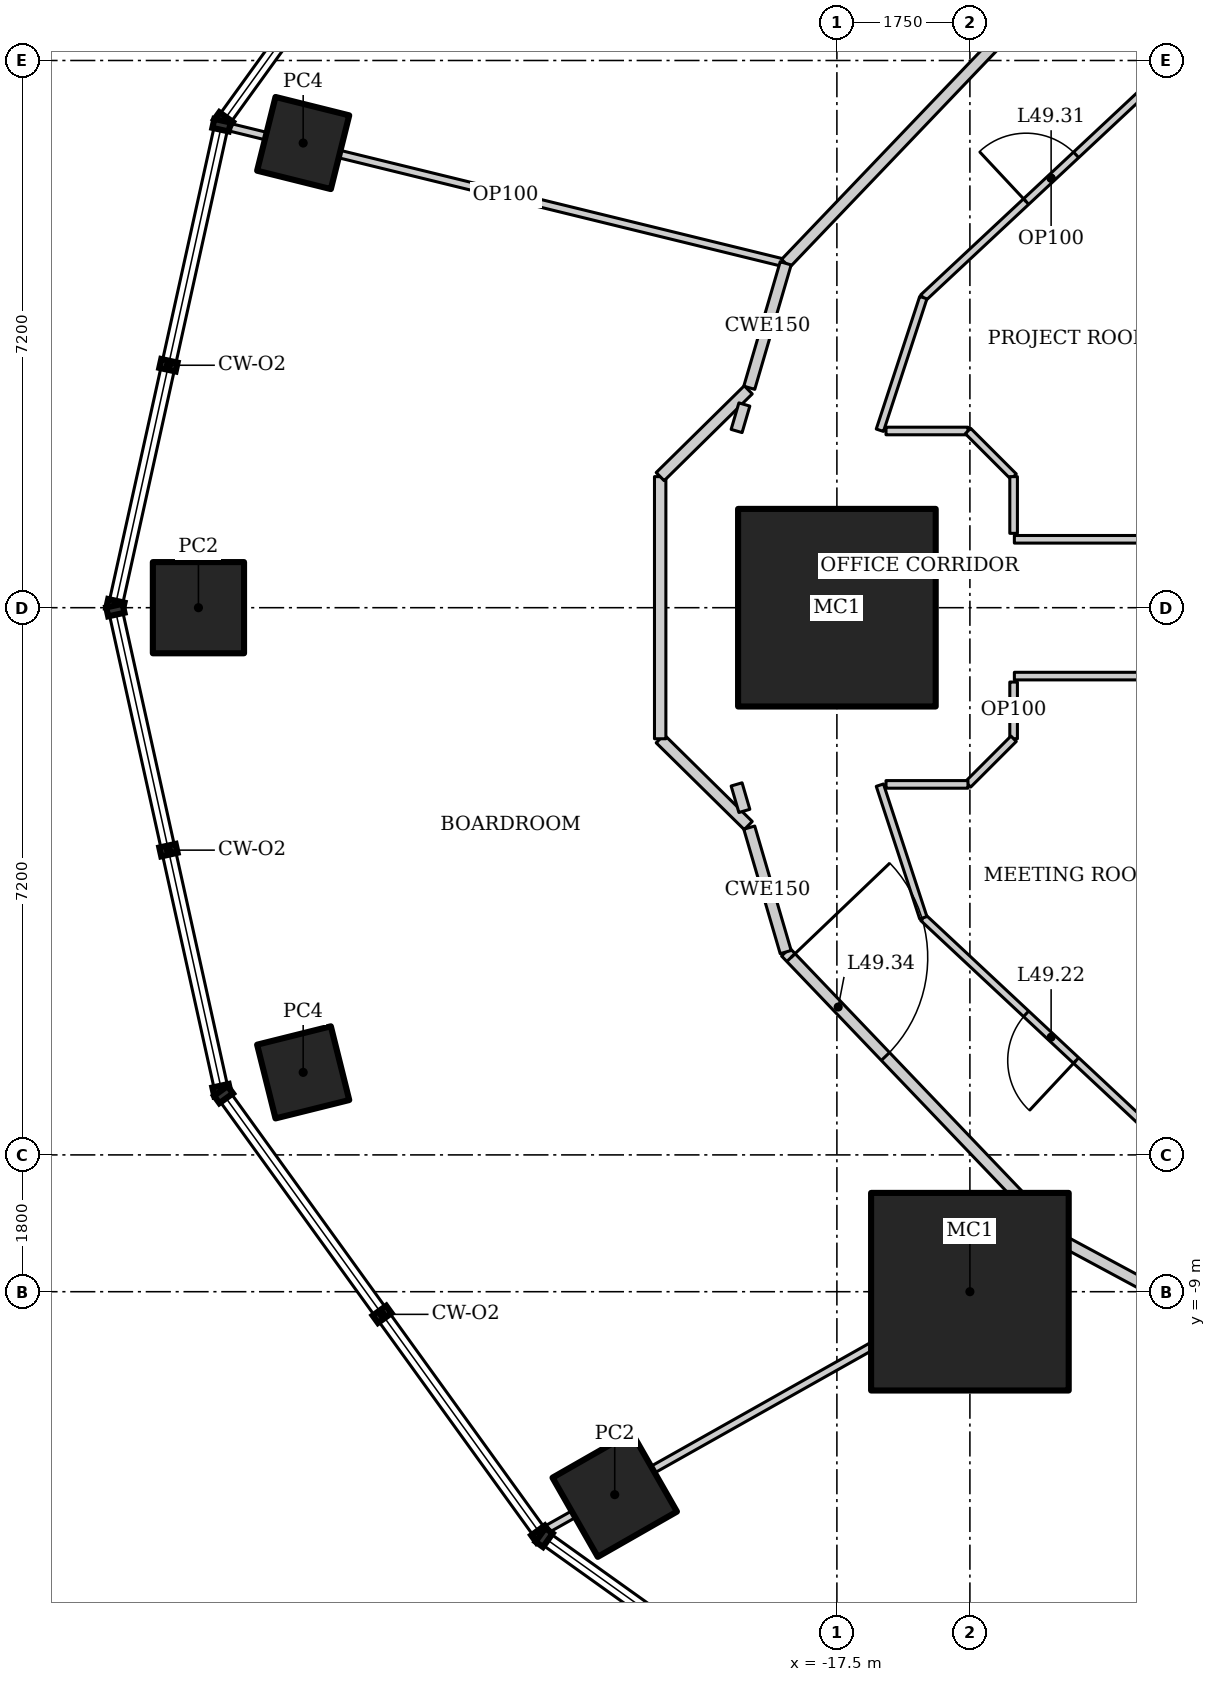
"""IFC4 building model, lengths in metres.
Left out: names, types, materials, properties, quantities, classifications, styles, units other than length and angle.
Written with IfcOpenShell. Run it as: python <this file> out.ifc"""

import sys

from ifc_helpers import new_model, si_unit, direction, frame, frame_2d, origin, origin_2d, place, context, subcontext, project, spatial, rectangle, hollow_rectangle, extrude, element, fill, save


model = new_model("IFC4")
c1 = context("Model", 3, precision=1e-05, world=origin(), true_north=direction((0.0, 1.0)))
c2 = subcontext(c1, "Body", "Model", "MODEL_VIEW")
j1 = project(units=[si_unit("LENGTHUNIT", "METRE"), si_unit("PLANEANGLEUNIT", "RADIAN")], contexts=[c1])
p1 = place(None, origin())
s1 = spatial("IfcSite", under=j1, at=p1, CompositionType="ELEMENT")
p2 = place(p1, origin())
s2 = spatial("IfcBuilding", under=s1, at=p2, CompositionType="ELEMENT")
p3 = place(p2, frame((0.0, 0.0, 211.6)))
s3 = spatial("IfcBuildingStorey", under=s2, at=p3, CompositionType="ELEMENT", Elevation=211.6)
for number, where, z_axis, x_axis in (
    (1, (-17.5, 0.0, 0.0), (0.0, 0.0, 1.0), (1.0, 0.0, 0.0)),
    (2, (-15.75, -9.0, 0.0), (0.0, 0.0, 1.0), (1.0, 0.0, 0.0)),
):
    element("IfcColumn", number, at=place(p3, frame(where, z_axis=z_axis, x_axis=x_axis)), inside=s3, PredefinedType="COLUMN", context=c2, shape_type="SweptSolid", body=[
        extrude(hollow_rectangle(XDim=2.6, YDim=2.6, WallThickness=0.13, at=origin_2d()), origin(), (0.0, 0.0, 1.0), 4.2),
    ])
p4 = place(p3, frame((-24.522, 6.114, 0.0), z_axis=(0.0, 0.0, 1.0), x_axis=(0.2419218956, 0.970295726276, 0.0)))
e3 = element("IfcColumn", 3, at=p4, inside=s3, PredefinedType="COLUMN", context=c2, shape_type="SweptSolid", body=[
    extrude(hollow_rectangle(XDim=1.0, YDim=1.0, WallThickness=0.08, at=origin_2d()), origin(), (0.0, 0.0, 1.0), 4.2),
])
p5 = place(p3, frame((-25.9, 0.0, 0.0), z_axis=(0.0, 0.0, 1.0), x_axis=(1.0, 0.0, 0.0)))
e4 = element("IfcColumn", 4, at=p5, inside=s3, PredefinedType="COLUMN", context=c2, shape_type="SweptSolid", body=[
    extrude(hollow_rectangle(XDim=1.2, YDim=1.2, WallThickness=0.1, at=origin_2d()), origin(), (0.0, 0.0, 1.0), 4.2),
])
p6 = place(p3, frame((-24.522, -6.114, 0.0), z_axis=(0.0, 0.0, 1.0), x_axis=(0.970295726276, 0.2419218956, 0.0)))
e5 = element("IfcColumn", 5, at=p6, inside=s3, PredefinedType="COLUMN", context=c2, shape_type="SweptSolid", body=[
    extrude(hollow_rectangle(XDim=1.0, YDim=1.0, WallThickness=0.08, at=origin_2d()), origin(), (0.0, 0.0, 1.0), 4.2),
])
p7 = place(p3, frame((-20.423, -11.67, 0.0), z_axis=(0.0, 0.0, 1.0), x_axis=(0.86824298017, 0.496139221777, 0.0)))
e6 = element("IfcColumn", 6, at=p7, inside=s3, PredefinedType="COLUMN", context=c2, shape_type="SweptSolid", body=[
    extrude(hollow_rectangle(XDim=1.2, YDim=1.2, WallThickness=0.1, at=origin_2d()), origin(), (0.0, 0.0, 1.0), 4.2),
])
p8 = place(p3, frame((-25.543, 6.336, 0.0), z_axis=(0.0, 0.0, 1.0), x_axis=(0.97130474594, -0.237838370569, 0.0)))
e7 = element("IfcWall", 7, at=p8, inside=s3, PredefinedType="PARTITIONING", context=c2, shape_type="SweptSolid", body=[
    extrude(rectangle(XDim=7.587, YDim=0.1, at=frame_2d((3.793, 0.0))), origin(), (0.0, 0.0, 1.0), 3.108),
])
p9 = place(p3, frame((-21.358, -12.15, 0.0), z_axis=(0.0, 0.0, 1.0), x_axis=(0.871273053995, 0.490798599614, 0.0)))
e8 = element("IfcWall", 8, at=p9, inside=s3, PredefinedType="PARTITIONING", context=c2, shape_type="SweptSolid", body=[
    extrude(rectangle(XDim=7.807, YDim=0.1, at=frame_2d((3.904, 0.0))), origin(), (0.0, 0.0, 1.0), 3.524),
])
p10 = place(p3, frame((-14.556, 8.318, 0.0), z_axis=(0.0, 0.0, 1.0), x_axis=(-0.690768413292, -0.723076067366, 0.0)))
e9 = element("IfcWall", 9, at=p10, inside=s3, PredefinedType="PARTITIONING", context=c2, shape_type="SweptSolid", body=[
    extrude(rectangle(XDim=5.237, YDim=0.15, at=frame_2d((2.618, 0.0))), origin(), (0.0, 0.0, 1.0), 4.05),
])
p11 = place(p3, frame((-18.174, -4.531, 0.0), z_axis=(0.0, 0.0, 1.0), x_axis=(0.690768413292, -0.723076067366, 0.0)))
e10 = element("IfcWall", 10, at=p11, inside=s3, PredefinedType="PARTITIONING", context=c2, shape_type="SweptSolid", body=[
    extrude(rectangle(XDim=5.237, YDim=0.15, at=frame_2d((2.618, 0.0))), origin(), (0.0, 0.0, 1.0), 4.05),
])
p12 = place(p11, frame((0.1, 0.0, 0.0)))
e11 = element("IfcOpeningElement", 11, at=p12, cuts=e10, PredefinedType="OPENING", context=c2, shape_type="SweptSolid", body=[
    extrude(rectangle(XDim=1.8, YDim=2.1, at=frame_2d((0.9, 1.05))), frame((0.0, 0.085, 0.0), z_axis=(0.0, -1.0, 0.0), x_axis=(1.0, 0.0, 0.0)), (0.0, 0.0, 1.0), 0.17),
])
p13 = place(p3, frame((-14.556, -8.318, 0.0), z_axis=(0.0, 0.0, 1.0), x_axis=(0.88053863253, -0.47397438393, 0.0)))
e12 = element("IfcWall", 12, at=p13, inside=s3, PredefinedType="PARTITIONING", context=c2, shape_type="SweptSolid", body=[
    extrude(rectangle(XDim=4.875, YDim=0.15, at=frame_2d((2.438, 0.0))), origin(), (0.0, 0.0, 1.0), 4.05),
])
p14 = place(p3, frame((-13.0, -7.222, 0.0), z_axis=(0.0, 0.0, 1.0), x_axis=(-0.730651186567, 0.682750938167, 0.0)))
e13 = element("IfcWall", 13, at=p14, inside=s3, PredefinedType="PARTITIONING", context=c2, shape_type="SweptSolid", body=[
    extrude(rectangle(XDim=4.603, YDim=0.1, at=frame_2d((2.301, 0.0))), origin(), (0.0, 0.0, 1.0), 4.05),
])
p15 = place(p14, frame((1.851, 0.0, 0.0)))
e14 = element("IfcOpeningElement", 14, at=p15, cuts=e13, PredefinedType="OPENING", context=c2, shape_type="SweptSolid", body=[
    extrude(rectangle(XDim=0.9, YDim=2.1, at=frame_2d((0.45, 1.05))), frame((0.0, 0.06, 0.0), z_axis=(0.0, -1.0, 0.0), x_axis=(1.0, 0.0, 0.0)), (0.0, 0.0, 1.0), 0.12),
])
p16 = place(p3, frame((-16.363, 4.08, 0.0), z_axis=(0.0, 0.0, 1.0), x_axis=(0.730651186567, 0.682750938167, 0.0)))
e15 = element("IfcWall", 15, at=p16, inside=s3, PredefinedType="PARTITIONING", context=c2, shape_type="SweptSolid", body=[
    extrude(rectangle(XDim=4.603, YDim=0.1, at=frame_2d((2.301, 0.0))), origin(), (0.0, 0.0, 1.0), 4.05),
])
p17 = place(p16, frame((1.851, 0.0, 0.0)))
e16 = element("IfcOpeningElement", 16, at=p17, cuts=e15, PredefinedType="OPENING", context=c2, shape_type="SweptSolid", body=[
    extrude(rectangle(XDim=0.9, YDim=2.1, at=frame_2d((0.45, 1.05))), frame((0.0, 0.06, 0.0), z_axis=(0.0, -1.0, 0.0), x_axis=(1.0, 0.0, 0.0)), (0.0, 0.0, 1.0), 0.12),
])
p18 = place(p3, frame((-12.6, -13.0, 0.0), z_axis=(0.0, 0.0, 1.0), x_axis=(-0.682434118301, -0.730947107648, 0.0)))
e17 = element("IfcWall", 17, at=p18, inside=s3, PredefinedType="PARTITIONING", context=c2, shape_type="SweptSolid", body=[
    extrude(rectangle(XDim=2.702, YDim=0.1, at=frame_2d((1.351, 0.0))), origin(), (0.0, 0.0, 1.0), 3.41),
])
for number, where, z_axis, x_axis in (
    (18, (-18.174, 4.531, 0.0), (0.0, 0.0, 1.0), (-0.281, -0.96, 0.0)),
    (19, (-18.653, -2.894, 0.0), (0.0, 0.0, 1.0), (0.281, -0.96, 0.0)),
):
    element("IfcWall", number, at=place(p3, frame(where, z_axis=z_axis, x_axis=x_axis)), inside=s3, PredefinedType="PARTITIONING", context=c2, shape_type="SweptSolid", body=[
        extrude(rectangle(XDim=1.706, YDim=0.15, at=frame_2d((0.853, 0.0))), origin(), (0.0, 0.0, 1.0), 4.05),
    ])
p19 = place(p3, frame((-16.363, -4.08, 0.0), z_axis=(0.0, 0.0, 1.0), x_axis=(-0.311517212063, 0.950240509865, 0.0)))
e20 = element("IfcWall", 20, at=p19, inside=s3, PredefinedType="PARTITIONING", context=c2, shape_type="SweptSolid", body=[
    extrude(rectangle(XDim=1.836, YDim=0.1, at=frame_2d((0.918, 0.0))), origin(), (0.0, 0.0, 1.0), 4.05),
])
for number, where, z_axis, x_axis in (
    (21, (-15.165, -0.9, 0.0), (0.0, 0.0, 1.0), (1.0, 0.0, 0.0)),
    (22, (-13.0, 0.9, 0.0), (0.0, 0.0, 1.0), (-1.0, 0.0, 0.0)),
):
    element("IfcWall", number, at=place(p3, frame(where, z_axis=z_axis, x_axis=x_axis)), inside=s3, PredefinedType="PARTITIONING", context=c2, shape_type="SweptSolid", body=[
        extrude(rectangle(XDim=2.165, YDim=0.1, at=frame_2d((1.083, 0.0))), origin(), (0.0, 0.0, 1.0), 4.05),
    ])
p20 = place(p3, frame((-16.935, 2.335, 0.0), z_axis=(0.0, 0.0, 1.0), x_axis=(0.311517212063, 0.950240509865, 0.0)))
e23 = element("IfcWall", 23, at=p20, inside=s3, PredefinedType="PARTITIONING", context=c2, shape_type="SweptSolid", body=[
    extrude(rectangle(XDim=1.836, YDim=0.1, at=frame_2d((0.918, 0.0))), origin(), (0.0, 0.0, 1.0), 4.05),
])
p21 = place(p3, frame((-15.175, -0.978, 0.0), z_axis=(0.0, 0.0, 1.0), x_axis=(0.0, -1.0, 0.0)))
e24 = element("IfcWall", 24, at=p21, inside=s3, PredefinedType="PARTITIONING", context=c2, shape_type="SweptSolid", body=[
    extrude(rectangle(XDim=0.746, YDim=0.1, at=frame_2d((0.373, 0.0))), origin(), (0.0, 0.0, 1.0), 4.05),
])
p22 = place(p3, frame((-15.175, -1.725, 0.0), z_axis=(0.0, 0.0, 1.0), x_axis=(-0.707106781187, -0.707106781187, 0.0)))
e25 = element("IfcWall", 25, at=p22, inside=s3, PredefinedType="PARTITIONING", context=c2, shape_type="SweptSolid", body=[
    extrude(rectangle(XDim=0.849, YDim=0.1, at=frame_2d((0.425, 0.0))), origin(), (0.0, 0.0, 1.0), 4.05),
])
for number, where, z_axis, x_axis in (
    (26, (-15.775, -2.325, 0.0), (0.0, 0.0, 1.0), (-1.0, 0.0, 0.0)),
    (27, (-16.854, 2.325, 0.0), (0.0, 0.0, 1.0), (1.0, 0.0, 0.0)),
):
    element("IfcWall", number, at=place(p3, frame(where, z_axis=z_axis, x_axis=x_axis)), inside=s3, PredefinedType="PARTITIONING", context=c2, shape_type="SweptSolid", body=[
        extrude(rectangle(XDim=1.078, YDim=0.1, at=frame_2d((0.539, 0.0))), origin(), (0.0, 0.0, 1.0), 4.05),
    ])
p23 = place(p3, frame((-15.775, 2.325, 0.0), z_axis=(0.0, 0.0, 1.0), x_axis=(0.707106781187, -0.707106781187, 0.0)))
e28 = element("IfcWall", 28, at=p23, inside=s3, PredefinedType="PARTITIONING", context=c2, shape_type="SweptSolid", body=[
    extrude(rectangle(XDim=0.849, YDim=0.1, at=frame_2d((0.425, 0.0))), origin(), (0.0, 0.0, 1.0), 4.05),
])
p24 = place(p3, frame((-15.175, 1.725, 0.0), z_axis=(0.0, 0.0, 1.0), x_axis=(0.0, -1.0, 0.0)))
e29 = element("IfcWall", 29, at=p24, inside=s3, PredefinedType="PARTITIONING", context=c2, shape_type="SweptSolid", body=[
    extrude(rectangle(XDim=0.746, YDim=0.1, at=frame_2d((0.373, 0.0))), origin(), (0.0, 0.0, 1.0), 4.05),
])
p25 = place(p3, frame((-18.666, -2.866, 0.0), z_axis=(0.0, 0.0, 1.0), x_axis=(-0.712265481509, 0.701910167935, 0.0)))
e30 = element("IfcWall", 30, at=p25, inside=s3, PredefinedType="PARTITIONING", context=c2, shape_type="SweptSolid", body=[
    extrude(rectangle(XDim=1.627, YDim=0.15, at=frame_2d((0.813, 0.0))), origin(), (0.0, 0.0, 1.0), 4.05),
])
p26 = place(p3, frame((-19.825, -1.725, 0.0), z_axis=(0.0, 0.0, 1.0), x_axis=(0.0, 1.0, 0.0)))
e31 = element("IfcWall", 31, at=p26, inside=s3, PredefinedType="PARTITIONING", context=c2, shape_type="SweptSolid", body=[
    extrude(rectangle(XDim=3.449, YDim=0.15, at=frame_2d((1.725, 0.0))), origin(), (0.0, 0.0, 1.0), 4.05),
])
p27 = place(p3, frame((-19.825, 1.725, 0.0), z_axis=(0.0, 0.0, 1.0), x_axis=(0.712265481509, 0.701910167935, 0.0)))
e32 = element("IfcWall", 32, at=p27, inside=s3, PredefinedType="PARTITIONING", context=c2, shape_type="SweptSolid", body=[
    extrude(rectangle(XDim=1.627, YDim=0.15, at=frame_2d((0.813, 0.0))), origin(), (0.0, 0.0, 1.0), 4.05),
])
for number, where, z_axis, x_axis in (
    (33, (-18.717, 2.674, 0.0), (0.0, 0.0, 1.0), (-0.281, -0.96, 0.0)),
    (34, (-18.82, -2.325, 0.0), (0.0, 0.0, 1.0), (0.281, -0.96, 0.0)),
):
    element("IfcWall", number, at=place(p3, frame(where, z_axis=z_axis, x_axis=x_axis)), inside=s3, PredefinedType="PARTITIONING", context=c2, shape_type="SweptSolid", body=[
        extrude(rectangle(XDim=0.364, YDim=0.15, at=frame_2d((0.182, 0.0))), origin(), (0.0, 0.0, 1.0), 4.05),
    ])
p28 = place(p15, origin())
e35 = element("IfcDoor", 35, at=p28, inside=s3, OperationType="SINGLE_SWING_LEFT", PredefinedType="DOOR", context=c2, shape_type="SweptSolid", body=[
    extrude(rectangle(XDim=0.9, YDim=2.1, at=frame_2d((0.45, 1.05))), frame((0.0, 0.025, 0.0), z_axis=(0.0, -1.0, 0.0), x_axis=(1.0, 0.0, 0.0)), (0.0, 0.0, 1.0), 0.05),
])
fill(e14, e35)
p29 = place(p17, origin())
e36 = element("IfcDoor", 36, at=p29, inside=s3, OperationType="SINGLE_SWING_LEFT", PredefinedType="DOOR", context=c2, shape_type="SweptSolid", body=[
    extrude(rectangle(XDim=0.9, YDim=2.1, at=frame_2d((0.45, 1.05))), frame((0.0, 0.025, 0.0), z_axis=(0.0, -1.0, 0.0), x_axis=(1.0, 0.0, 0.0)), (0.0, 0.0, 1.0), 0.05),
])
fill(e16, e36)
p30 = place(p12, origin())
e37 = element("IfcDoor", 37, at=p30, inside=s3, OperationType="DOUBLE_DOOR_DOUBLE_SWING", PredefinedType="DOOR", context=c2, shape_type="SweptSolid", body=[
    extrude(rectangle(XDim=1.8, YDim=2.1, at=frame_2d((0.9, 1.05))), frame((0.0, 0.025, 0.0), z_axis=(0.0, -1.0, 0.0), x_axis=(1.0, 0.0, 0.0)), (0.0, 0.0, 1.0), 0.05),
])
fill(e11, e37)
save(model, sys.argv[1])
